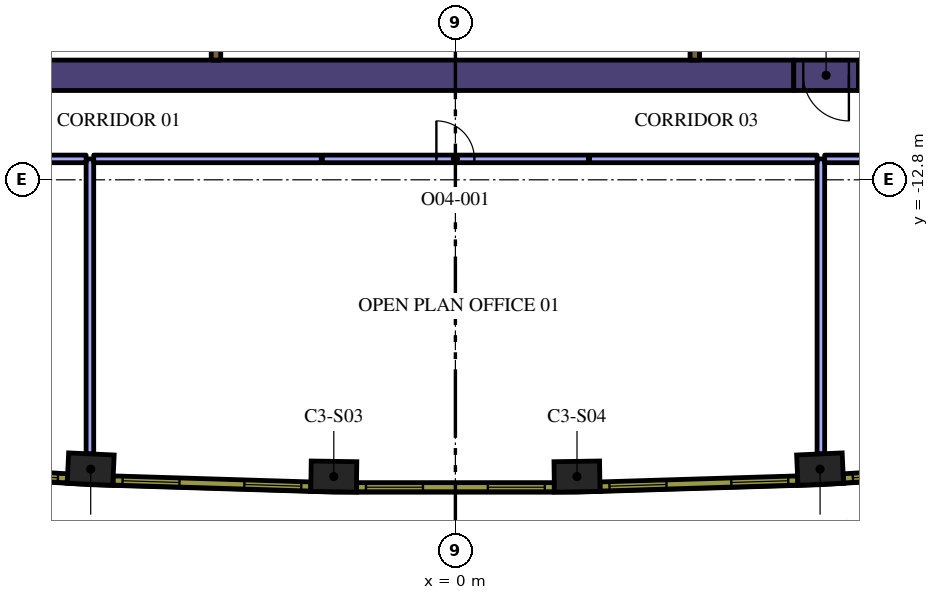
"""IFC4 building model, lengths in metres.
Left out: names, types, materials, properties, quantities, classifications, styles, units other than length and angle.
Written with IfcOpenShell. Run it as: python <this file> out.ifc"""

import sys

from ifc_helpers import new_model, si_unit, direction, frame, frame_2d, origin, origin_2d, place, context, subcontext, project, spatial, rectangle, extrude, element, fill, save


model = new_model("IFC4")
c1 = context("Model", 3, precision=1e-05, world=origin(), true_north=direction((0.0, 1.0)))
c2 = subcontext(c1, "Body", "Model", "MODEL_VIEW")
j1 = project(units=[si_unit("LENGTHUNIT", "METRE"), si_unit("PLANEANGLEUNIT", "RADIAN")], contexts=[c1])
p1 = place(None, origin())
s1 = spatial("IfcSite", under=j1, at=p1, CompositionType="ELEMENT")
p2 = place(p1, origin())
s2 = spatial("IfcBuilding", under=s1, at=p2, CompositionType="ELEMENT")
p3 = place(p2, frame((0.0, 0.0, 183.6)))
s3 = spatial("IfcBuildingStorey", under=s2, at=p3, CompositionType="ELEMENT", Elevation=183.6)
for number, where, z_axis, x_axis in (
    (1, (-9.597, -20.413, 0.0), (0.0, 0.0, 1.0), (0.999, -0.046, 0.0)),
    (2, (-3.2, -20.608, 0.0), (0.0, 0.0, 1.0), (1.0, -0.015, 0.0)),
    (3, (3.2, -20.608, 0.0), (0.0, 0.0, 1.0), (1.0, 0.015, 0.0)),
    (4, (9.597, -20.413, 0.0), (0.0, 0.0, 1.0), (0.999, 0.046, 0.0)),
):
    element("IfcColumn", number, at=place(p3, frame(where, z_axis=z_axis, x_axis=x_axis)), inside=s3, PredefinedType="COLUMN", context=c2, shape_type="SweptSolid", body=[
        extrude(rectangle(XDim=1.2, YDim=0.8, at=origin_2d()), origin(), (0.0, 0.0, 1.0), 4.2),
    ])
p4 = place(p3, frame((10.604, -10.05, 0.0), z_axis=(0.0, 0.0, 1.0), x_axis=(1.0, 0.0, 0.0)))
e5 = element("IfcWall", 5, at=p4, inside=s3, PredefinedType="SOLIDWALL", context=c2, shape_type="SweptSolid", body=[
    extrude(rectangle(XDim=1.849, YDim=0.8, at=frame_2d((0.925, 0.0))), origin(), (0.0, 0.0, 1.0), 4.2),
])
p5 = place(p3, frame((-13.378, -10.05, 0.0), z_axis=(0.0, 0.0, 1.0), x_axis=(1.0, 0.0, 0.0)))
e6 = element("IfcWall", 6, at=p5, inside=s3, PredefinedType="SOLIDWALL", context=c2, shape_type="SweptSolid", body=[
    extrude(rectangle(XDim=22.282, YDim=0.8, at=frame_2d((11.141, 0.0))), origin(), (0.0, 0.0, 1.0), 4.2),
])
p6 = place(p3, frame((-6.3, -8.925, 0.0), z_axis=(0.0, 0.0, 1.0), x_axis=(0.0, -1.0, 0.0)))
e7 = element("IfcWall", 7, at=p6, inside=s3, PredefinedType="SOLIDWALL", context=c2, shape_type="SweptSolid", body=[
    extrude(rectangle(XDim=0.725, YDim=0.25, at=frame_2d((0.363, 0.0))), origin(), (0.0, 0.0, 1.0), 4.2),
])
p7 = place(p3, frame((6.3, -9.65, 0.0), z_axis=(0.0, 0.0, 1.0), x_axis=(0.0, 1.0, 0.0)))
e8 = element("IfcWall", 8, at=p7, inside=s3, PredefinedType="SOLIDWALL", context=c2, shape_type="SweptSolid", body=[
    extrude(rectangle(XDim=1.008, YDim=0.25, at=frame_2d((0.504, 0.0))), origin(), (0.0, 0.0, 1.0), 4.2),
])
p8 = place(p3, frame((10.604, -10.05, 0.0), z_axis=(0.0, 0.0, 1.0), x_axis=(-1.0, 0.0, 0.0)))
e9 = element("IfcWall", 9, at=p8, inside=s3, PredefinedType="SOLIDWALL", context=c2, shape_type="SweptSolid", body=[
    extrude(rectangle(XDim=1.7, YDim=0.8, at=frame_2d((0.85, 0.0))), origin(), (0.0, 0.0, 1.0), 4.2),
])
p9 = place(p8, frame((0.25, 0.0, 0.0)))
e10 = element("IfcOpeningElement", 10, at=p9, cuts=e9, PredefinedType="OPENING", context=c2, shape_type="SweptSolid", body=[
    extrude(rectangle(XDim=1.2, YDim=2.1, at=frame_2d((0.6, 1.05))), frame((0.0, 0.41, 0.0), z_axis=(0.0, -1.0, 0.0), x_axis=(1.0, 0.0, 0.0)), (0.0, 0.0, 1.0), 0.82),
])
for number, where, z_axis, x_axis in (
    (11, (9.617, -12.25, 0.0), (0.0, 0.0, 1.0), (0.0, -1.0, 0.0)),
    (12, (-9.617, -20.011, 0.0), (0.0, 0.0, 1.0), (0.0, 1.0, 0.0)),
):
    element("IfcWall", number, at=place(p3, frame(where, z_axis=z_axis, x_axis=x_axis)), inside=s3, PredefinedType="PARTITIONING", context=c2, shape_type="SweptSolid", body=[
        extrude(rectangle(XDim=7.761, YDim=0.2, at=frame_2d((3.881, 0.0))), origin(), (0.0, 0.0, 1.0), 3.15),
    ])
p10 = place(p3, frame((-3.5, -12.25, 0.0), z_axis=(0.0, 0.0, 1.0), x_axis=(1.0, 0.0, 0.0)))
e13 = element("IfcWall", 13, at=p10, inside=s3, PredefinedType="PARTITIONING", context=c2, shape_type="SweptSolid", body=[
    extrude(rectangle(XDim=7.0, YDim=0.2, at=frame_2d((3.5, 0.0))), origin(), (0.0, 0.0, 1.0), 3.15),
])
p11 = place(p10, frame((3.0, 0.0, 0.0)))
e14 = element("IfcOpeningElement", 14, at=p11, cuts=e13, PredefinedType="OPENING", context=c2, shape_type="SweptSolid", body=[
    extrude(rectangle(XDim=1.0, YDim=2.1, at=frame_2d((0.5, 1.05))), frame((0.0, 0.11, 0.0), z_axis=(0.0, -1.0, 0.0), x_axis=(1.0, 0.0, 0.0)), (0.0, 0.0, 1.0), 0.22),
])
for number, where, z_axis, x_axis in (
    (15, (-9.517, -12.25, 0.0), (0.0, 0.0, 1.0), (1.0, 0.0, 0.0)),
    (16, (3.53, -12.25, 0.0), (0.0, 0.0, 1.0), (1.0, 0.0, 0.0)),
):
    element("IfcWall", number, at=place(p3, frame(where, z_axis=z_axis, x_axis=x_axis)), inside=s3, PredefinedType="PARTITIONING", context=c2, shape_type="SweptSolid", body=[
        extrude(rectangle(XDim=5.987, YDim=0.2, at=frame_2d((2.994, 0.0))), origin(), (0.0, 0.0, 1.0), 3.15),
    ])
p12 = place(p3, frame((9.717, -12.25, 0.0), z_axis=(0.0, 0.0, 1.0), x_axis=(1.0, 0.0, 0.0)))
e17 = element("IfcWall", 17, at=p12, inside=s3, PredefinedType="PARTITIONING", context=c2, shape_type="SweptSolid", body=[
    extrude(rectangle(XDim=4.688, YDim=0.2, at=frame_2d((2.344, 0.0))), origin(), (0.0, 0.0, 1.0), 3.15),
])
p13 = place(p12, frame((1.8, 0.0, 0.0)))
e18 = element("IfcOpeningElement", 18, at=p13, cuts=e17, PredefinedType="OPENING", context=c2, shape_type="SweptSolid", body=[
    extrude(rectangle(XDim=1.0, YDim=2.1, at=frame_2d((0.5, 1.05))), frame((0.0, 0.11, 0.0), z_axis=(0.0, -1.0, 0.0), x_axis=(1.0, 0.0, 0.0)), (0.0, 0.0, 1.0), 0.22),
])
p14 = place(p3, frame((-14.375, -12.25, 0.0), z_axis=(0.0, 0.0, 1.0), x_axis=(1.0, 0.0, 0.0)))
e19 = element("IfcWall", 19, at=p14, inside=s3, PredefinedType="PARTITIONING", context=c2, shape_type="SweptSolid", body=[
    extrude(rectangle(XDim=4.658, YDim=0.2, at=frame_2d((2.329, 0.0))), origin(), (0.0, 0.0, 1.0), 3.15),
])
p15 = place(p14, frame((1.8, 0.0, 0.0)))
e20 = element("IfcOpeningElement", 20, at=p15, cuts=e19, PredefinedType="OPENING", context=c2, shape_type="SweptSolid", body=[
    extrude(rectangle(XDim=1.0, YDim=2.1, at=frame_2d((0.5, 1.05))), frame((0.0, 0.11, 0.0), z_axis=(0.0, -1.0, 0.0), x_axis=(1.0, 0.0, 0.0)), (0.0, 0.0, 1.0), 0.22),
])
p16 = place(p3, frame((-15.405, -20.338, 0.0), z_axis=(0.0, 0.0, 1.0), x_axis=(0.998135294646, -0.061040425794, 0.0)))
e21 = element("IfcWall", 21, at=p16, inside=s3, PredefinedType="SOLIDWALL", context=c2, shape_type="SweptSolid", body=[
    extrude(rectangle(XDim=5.204, YDim=0.24, at=frame_2d((2.602, 0.0))), origin(), (0.0, 0.0, 1.0), 3.95),
])
p17 = place(p16, frame((0.248, 0.0, 0.9)))
e22 = element("IfcOpeningElement", 22, at=p17, cuts=e21, PredefinedType="OPENING", context=c2, shape_type="SweptSolid", body=[
    extrude(rectangle(XDim=1.5, YDim=2.55, at=frame_2d((0.75, 1.275))), frame((0.0, 0.13, 0.0), z_axis=(0.0, -1.0, 0.0), x_axis=(1.0, 0.0, 0.0)), (0.0, 0.0, 1.0), 0.26),
])
p18 = place(p16, frame((3.455, 0.0, 0.9)))
e23 = element("IfcOpeningElement", 23, at=p18, cuts=e21, PredefinedType="OPENING", context=c2, shape_type="SweptSolid", body=[
    extrude(rectangle(XDim=1.5, YDim=2.55, at=frame_2d((0.75, 1.275))), frame((0.0, 0.13, 0.0), z_axis=(0.0, -1.0, 0.0), x_axis=(1.0, 0.0, 0.0)), (0.0, 0.0, 1.0), 0.26),
])
p19 = place(p3, frame((-9.007, -20.711, 0.0), z_axis=(0.0, 0.0, 1.0), x_axis=(0.999533441983, -0.030543384845, 0.0)))
e24 = element("IfcWall", 24, at=p19, inside=s3, PredefinedType="SOLIDWALL", context=c2, shape_type="SweptSolid", body=[
    extrude(rectangle(XDim=5.204, YDim=0.24, at=frame_2d((2.602, 0.0))), origin(), (0.0, 0.0, 1.0), 3.95),
])
p20 = place(p19, frame((0.248, 0.0, 0.9)))
e25 = element("IfcOpeningElement", 25, at=p20, cuts=e24, PredefinedType="OPENING", context=c2, shape_type="SweptSolid", body=[
    extrude(rectangle(XDim=1.5, YDim=2.55, at=frame_2d((0.75, 1.275))), frame((0.0, 0.13, 0.0), z_axis=(0.0, -1.0, 0.0), x_axis=(1.0, 0.0, 0.0)), (0.0, 0.0, 1.0), 0.26),
])
p21 = place(p19, frame((3.455, 0.0, 0.9)))
e26 = element("IfcOpeningElement", 26, at=p21, cuts=e24, PredefinedType="OPENING", context=c2, shape_type="SweptSolid", body=[
    extrude(rectangle(XDim=1.5, YDim=2.55, at=frame_2d((0.75, 1.275))), frame((0.0, 0.13, 0.0), z_axis=(0.0, -1.0, 0.0), x_axis=(1.0, 0.0, 0.0)), (0.0, 0.0, 1.0), 0.26),
])
p22 = place(p3, frame((-2.602, -20.888, 0.0), z_axis=(0.0, 0.0, 1.0), x_axis=(1.0, 0.0, 0.0)))
e27 = element("IfcWall", 27, at=p22, inside=s3, PredefinedType="SOLIDWALL", context=c2, shape_type="SweptSolid", body=[
    extrude(rectangle(XDim=5.204, YDim=0.24, at=frame_2d((2.602, 0.0))), origin(), (0.0, 0.0, 1.0), 3.95),
])
p23 = place(p22, frame((0.248, 0.0, 0.9)))
e28 = element("IfcOpeningElement", 28, at=p23, cuts=e27, PredefinedType="OPENING", context=c2, shape_type="SweptSolid", body=[
    extrude(rectangle(XDim=1.5, YDim=2.55, at=frame_2d((0.75, 1.275))), frame((0.0, 0.13, 0.0), z_axis=(0.0, -1.0, 0.0), x_axis=(1.0, 0.0, 0.0)), (0.0, 0.0, 1.0), 0.26),
])
p24 = place(p22, frame((3.455, 0.0, 0.9)))
e29 = element("IfcOpeningElement", 29, at=p24, cuts=e27, PredefinedType="OPENING", context=c2, shape_type="SweptSolid", body=[
    extrude(rectangle(XDim=1.5, YDim=2.55, at=frame_2d((0.75, 1.275))), frame((0.0, 0.13, 0.0), z_axis=(0.0, -1.0, 0.0), x_axis=(1.0, 0.0, 0.0)), (0.0, 0.0, 1.0), 0.26),
])
p25 = place(p3, frame((3.806, -20.87, 0.0), z_axis=(0.0, 0.0, 1.0), x_axis=(0.999533441983, 0.030543384845, 0.0)))
e30 = element("IfcWall", 30, at=p25, inside=s3, PredefinedType="SOLIDWALL", context=c2, shape_type="SweptSolid", body=[
    extrude(rectangle(XDim=5.204, YDim=0.24, at=frame_2d((2.602, 0.0))), origin(), (0.0, 0.0, 1.0), 3.95),
])
p26 = place(p25, frame((0.248, 0.0, 0.9)))
e31 = element("IfcOpeningElement", 31, at=p26, cuts=e30, PredefinedType="OPENING", context=c2, shape_type="SweptSolid", body=[
    extrude(rectangle(XDim=1.5, YDim=2.55, at=frame_2d((0.75, 1.275))), frame((0.0, 0.13, 0.0), z_axis=(0.0, -1.0, 0.0), x_axis=(1.0, 0.0, 0.0)), (0.0, 0.0, 1.0), 0.26),
])
p27 = place(p25, frame((3.455, 0.0, 0.9)))
e32 = element("IfcOpeningElement", 32, at=p27, cuts=e30, PredefinedType="OPENING", context=c2, shape_type="SweptSolid", body=[
    extrude(rectangle(XDim=1.5, YDim=2.55, at=frame_2d((0.75, 1.275))), frame((0.0, 0.13, 0.0), z_axis=(0.0, -1.0, 0.0), x_axis=(1.0, 0.0, 0.0)), (0.0, 0.0, 1.0), 0.26),
])
p28 = place(p3, frame((10.211, -20.656, 0.0), z_axis=(0.0, 0.0, 1.0), x_axis=(0.998135294646, 0.061040425794, 0.0)))
e33 = element("IfcWall", 33, at=p28, inside=s3, PredefinedType="SOLIDWALL", context=c2, shape_type="SweptSolid", body=[
    extrude(rectangle(XDim=5.204, YDim=0.24, at=frame_2d((2.602, 0.0))), origin(), (0.0, 0.0, 1.0), 3.95),
])
p29 = place(p28, frame((0.248, 0.0, 0.9)))
e34 = element("IfcOpeningElement", 34, at=p29, cuts=e33, PredefinedType="OPENING", context=c2, shape_type="SweptSolid", body=[
    extrude(rectangle(XDim=1.5, YDim=2.55, at=frame_2d((0.75, 1.275))), frame((0.0, 0.13, 0.0), z_axis=(0.0, -1.0, 0.0), x_axis=(1.0, 0.0, 0.0)), (0.0, 0.0, 1.0), 0.26),
])
p30 = place(p28, frame((3.455, 0.0, 0.9)))
e35 = element("IfcOpeningElement", 35, at=p30, cuts=e33, PredefinedType="OPENING", context=c2, shape_type="SweptSolid", body=[
    extrude(rectangle(XDim=1.5, YDim=2.55, at=frame_2d((0.75, 1.275))), frame((0.0, 0.13, 0.0), z_axis=(0.0, -1.0, 0.0), x_axis=(1.0, 0.0, 0.0)), (0.0, 0.0, 1.0), 0.26),
])
p31 = place(p9, origin())
e36 = element("IfcDoor", 36, at=p31, inside=s3, OperationType="SINGLE_SWING_LEFT", PredefinedType="DOOR", context=c2, shape_type="SweptSolid", body=[
    extrude(rectangle(XDim=1.2, YDim=2.1, at=frame_2d((0.6, 1.05))), frame((0.0, 0.025, 0.0), z_axis=(0.0, -1.0, 0.0), x_axis=(1.0, 0.0, 0.0)), (0.0, 0.0, 1.0), 0.05),
])
fill(e10, e36)
p32 = place(p11, origin())
e37 = element("IfcDoor", 37, at=p32, inside=s3, OperationType="SINGLE_SWING_RIGHT", PredefinedType="DOOR", context=c2, shape_type="SweptSolid", body=[
    extrude(rectangle(XDim=1.0, YDim=2.1, at=frame_2d((0.5, 1.05))), frame((0.0, 0.025, 0.0), z_axis=(0.0, -1.0, 0.0), x_axis=(1.0, 0.0, 0.0)), (0.0, 0.0, 1.0), 0.05),
])
fill(e14, e37)
p33 = place(p18, origin())
e38 = element("IfcWindow", 38, at=p33, inside=s3, PartitioningType="SINGLE_PANEL", PredefinedType="WINDOW", context=c2, shape_type="SweptSolid", body=[
    extrude(rectangle(XDim=1.5, YDim=2.55, at=frame_2d((0.75, 1.275))), frame((0.0, 0.04, 0.0), z_axis=(0.0, -1.0, 0.0), x_axis=(1.0, 0.0, 0.0)), (0.0, 0.0, 1.0), 0.06),
])
fill(e23, e38)
p34 = place(p20, origin())
e39 = element("IfcWindow", 39, at=p34, inside=s3, PartitioningType="SINGLE_PANEL", PredefinedType="WINDOW", context=c2, shape_type="SweptSolid", body=[
    extrude(rectangle(XDim=1.5, YDim=2.55, at=frame_2d((0.75, 1.275))), frame((0.0, 0.04, 0.0), z_axis=(0.0, -1.0, 0.0), x_axis=(1.0, 0.0, 0.0)), (0.0, 0.0, 1.0), 0.06),
])
fill(e25, e39)
p35 = place(p21, origin())
e40 = element("IfcWindow", 40, at=p35, inside=s3, PartitioningType="SINGLE_PANEL", PredefinedType="WINDOW", context=c2, shape_type="SweptSolid", body=[
    extrude(rectangle(XDim=1.5, YDim=2.55, at=frame_2d((0.75, 1.275))), frame((0.0, 0.04, 0.0), z_axis=(0.0, -1.0, 0.0), x_axis=(1.0, 0.0, 0.0)), (0.0, 0.0, 1.0), 0.06),
])
fill(e26, e40)
p36 = place(p23, origin())
e41 = element("IfcWindow", 41, at=p36, inside=s3, PartitioningType="SINGLE_PANEL", PredefinedType="WINDOW", context=c2, shape_type="SweptSolid", body=[
    extrude(rectangle(XDim=1.5, YDim=2.55, at=frame_2d((0.75, 1.275))), frame((0.0, 0.04, 0.0), z_axis=(0.0, -1.0, 0.0), x_axis=(1.0, 0.0, 0.0)), (0.0, 0.0, 1.0), 0.06),
])
fill(e28, e41)
p37 = place(p24, origin())
e42 = element("IfcWindow", 42, at=p37, inside=s3, PartitioningType="SINGLE_PANEL", PredefinedType="WINDOW", context=c2, shape_type="SweptSolid", body=[
    extrude(rectangle(XDim=1.5, YDim=2.55, at=frame_2d((0.75, 1.275))), frame((0.0, 0.04, 0.0), z_axis=(0.0, -1.0, 0.0), x_axis=(1.0, 0.0, 0.0)), (0.0, 0.0, 1.0), 0.06),
])
fill(e29, e42)
p38 = place(p26, origin())
e43 = element("IfcWindow", 43, at=p38, inside=s3, PartitioningType="SINGLE_PANEL", PredefinedType="WINDOW", context=c2, shape_type="SweptSolid", body=[
    extrude(rectangle(XDim=1.5, YDim=2.55, at=frame_2d((0.75, 1.275))), frame((0.0, 0.04, 0.0), z_axis=(0.0, -1.0, 0.0), x_axis=(1.0, 0.0, 0.0)), (0.0, 0.0, 1.0), 0.06),
])
fill(e31, e43)
p39 = place(p27, origin())
e44 = element("IfcWindow", 44, at=p39, inside=s3, PartitioningType="SINGLE_PANEL", PredefinedType="WINDOW", context=c2, shape_type="SweptSolid", body=[
    extrude(rectangle(XDim=1.5, YDim=2.55, at=frame_2d((0.75, 1.275))), frame((0.0, 0.04, 0.0), z_axis=(0.0, -1.0, 0.0), x_axis=(1.0, 0.0, 0.0)), (0.0, 0.0, 1.0), 0.06),
])
fill(e32, e44)
p40 = place(p29, origin())
e45 = element("IfcWindow", 45, at=p40, inside=s3, PartitioningType="SINGLE_PANEL", PredefinedType="WINDOW", context=c2, shape_type="SweptSolid", body=[
    extrude(rectangle(XDim=1.5, YDim=2.55, at=frame_2d((0.75, 1.275))), frame((0.0, 0.04, 0.0), z_axis=(0.0, -1.0, 0.0), x_axis=(1.0, 0.0, 0.0)), (0.0, 0.0, 1.0), 0.06),
])
fill(e34, e45)
save(model, sys.argv[1])
